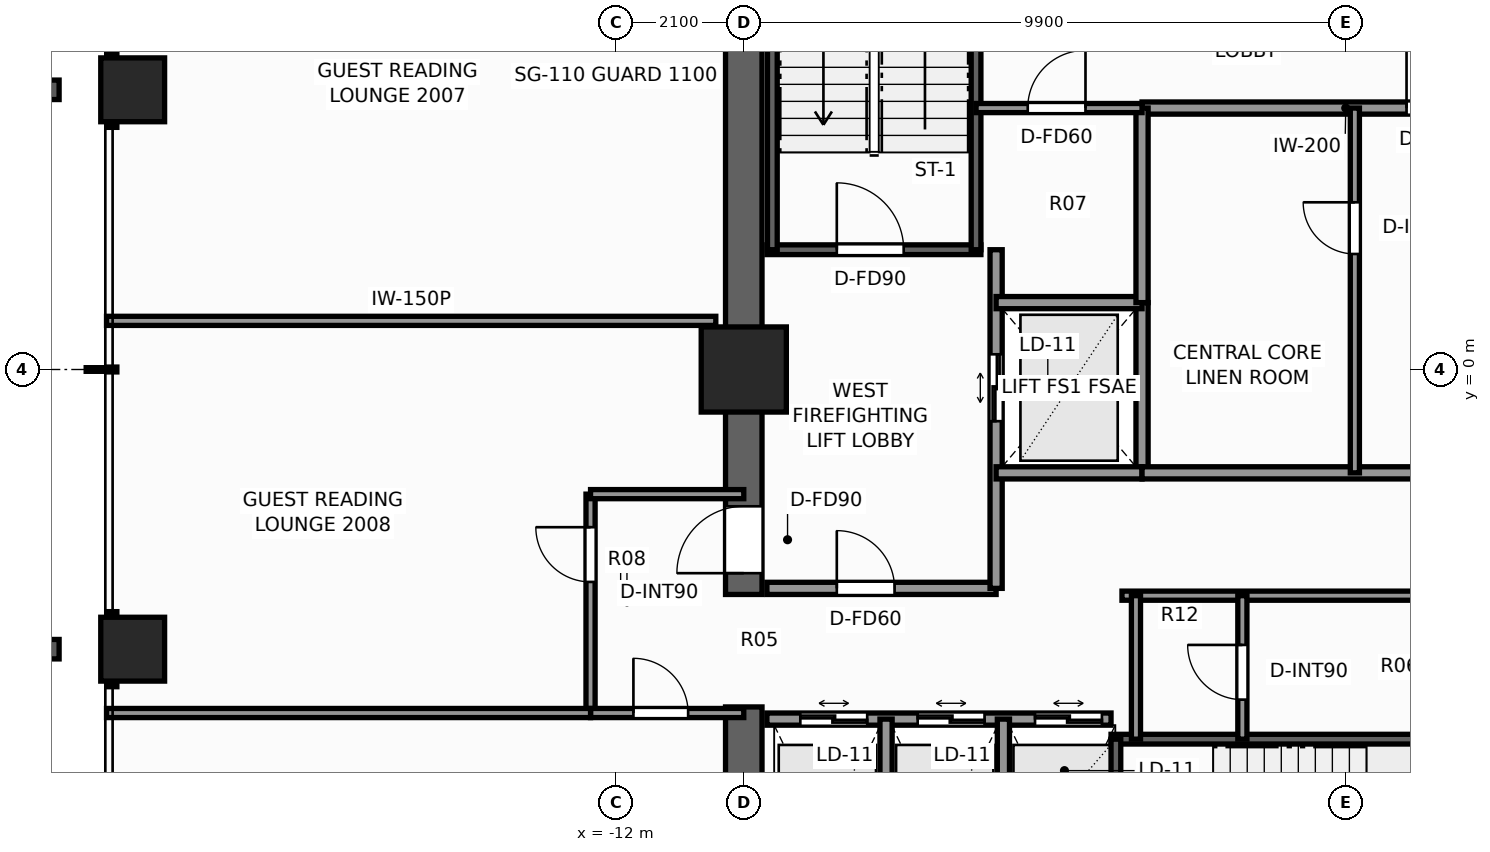
"""IFC4 building model, lengths in metres.
Left out: names, types, materials, properties, quantities, classifications, styles, units other than length and angle.
Written with IfcOpenShell. Run it as: python <this file> out.ifc"""

import sys

from ifc_helpers import new_model, si_unit, direction, frame, frame_2d, origin, origin_2d, place, context, subcontext, project, spatial, rectangle, extrude, element, fill, save


model = new_model("IFC4")
c1 = context("Model", 3, precision=1e-05, world=origin(), true_north=direction((0.0, 1.0)))
c2 = subcontext(c1, "Body", "Model", "MODEL_VIEW")
j1 = project(units=[si_unit("LENGTHUNIT", "METRE"), si_unit("PLANEANGLEUNIT", "RADIAN")], contexts=[c1])
p1 = place(None, origin())
s1 = spatial("IfcSite", under=j1, at=p1, CompositionType="ELEMENT")
p2 = place(p1, origin())
s2 = spatial("IfcBuilding", under=s1, at=p2, CompositionType="ELEMENT")
p3 = place(p2, frame((0.0, 0.0, 72.2)))
s3 = spatial("IfcBuildingStorey", under=s2, at=p3, CompositionType="ELEMENT", Elevation=72.2)
p4 = place(p3, frame((-9.9, -9.6, 0.0), z_axis=(0.0, 0.0, 1.0), x_axis=(0.0, 1.0, 0.0)))
e1 = element("IfcWall", 1, at=p4, inside=s3, PredefinedType="SHEAR", context=c2, shape_type="SweptSolid", body=[
    extrude(rectangle(XDim=4.05, YDim=0.6, at=frame_2d((2.025, 0.0))), origin(), (0.0, 0.0, 1.0), 3.3),
])
p5 = place(p3, frame((-9.9, -3.7, 0.0), z_axis=(0.0, 0.0, 1.0), x_axis=(0.0, 1.0, 0.0)))
e2 = element("IfcWall", 2, at=p5, inside=s3, PredefinedType="SHEAR", context=c2, shape_type="SweptSolid", body=[
    extrude(rectangle(XDim=13.3, YDim=0.6, at=frame_2d((6.65, 0.0))), origin(), (0.0, 0.0, 1.0), 3.3),
])
p6 = place(p5, frame((0.35, 0.0, 0.0)))
e3 = element("IfcOpeningElement", 3, at=p6, cuts=e2, PredefinedType="OPENING", context=c2, shape_type="SweptSolid", body=[
    extrude(rectangle(XDim=1.1, YDim=2.2, at=frame_2d((0.55, 1.1))), frame((0.0, 0.31, 0.0), z_axis=(0.0, -1.0, 0.0), x_axis=(1.0, 0.0, 0.0)), (0.0, 0.0, 1.0), 0.62),
])
p7 = place(p3, frame((-9.9, 0.0, 0.0), z_axis=(0.0, 0.0, 1.0), x_axis=(1.0, 0.0, 0.0)))
e4 = element("IfcColumn", 4, at=p7, inside=s3, PredefinedType="COLUMN", context=c2, shape_type="SweptSolid", body=[
    extrude(rectangle(XDim=1.4, YDim=1.4, at=origin_2d()), origin(), (0.0, 0.0, 1.0), 3.3),
])
for number, where, z_axis, x_axis in (
    (5, (-19.95, -4.6, 0.0), (0.0, 0.0, 1.0), (1.0, 0.0, 0.0)),
    (6, (-19.95, 4.6, 0.0), (0.0, 0.0, 1.0), (1.0, 0.0, 0.0)),
):
    element("IfcColumn", number, at=place(p3, frame(where, z_axis=z_axis, x_axis=x_axis)), inside=s3, PredefinedType="COLUMN", context=c2, shape_type="SweptSolid", body=[
        extrude(rectangle(XDim=1.05, YDim=1.05, at=origin_2d()), origin(), (0.0, 0.0, 1.0), 3.3),
    ])
p8 = place(p3, frame((-9.52, 1.97, 0.0), z_axis=(0.0, 0.0, 1.0), x_axis=(1.0, 0.0, 0.0)))
e7 = element("IfcWall", 7, at=p8, inside=s3, PredefinedType="SHEAR", context=c2, shape_type="SweptSolid", body=[
    extrude(rectangle(XDim=3.52, YDim=0.16, at=frame_2d((1.76, 0.0))), origin(), (0.0, 0.0, 1.0), 3.3),
])
p9 = place(p8, frame((1.15, 0.0, 0.0)))
e8 = element("IfcOpeningElement", 8, at=p9, cuts=e7, PredefinedType="OPENING", context=c2, shape_type="SweptSolid", body=[
    extrude(rectangle(XDim=1.1, YDim=2.2, at=frame_2d((0.55, 1.1))), frame((0.0, 0.09, 0.0), z_axis=(0.0, -1.0, 0.0), x_axis=(1.0, 0.0, 0.0)), (0.0, 0.0, 1.0), 0.18),
])
for number, where, z_axis, x_axis in (
    (9, (-9.43, 1.97, 0.0), (0.0, 0.0, 1.0), (0.0, 1.0, 0.0)),
    (10, (-6.08, 1.97, 0.0), (0.0, 0.0, 1.0), (0.0, 1.0, 0.0)),
):
    element("IfcWall", number, at=place(p3, frame(where, z_axis=z_axis, x_axis=x_axis)), inside=s3, PredefinedType="SHEAR", context=c2, shape_type="SweptSolid", body=[
        extrude(rectangle(XDim=7.56, YDim=0.16, at=frame_2d((3.78, 0.0))), origin(), (0.0, 0.0, 1.0), 3.3),
    ])
p10 = place(p3, frame((-3.86, -6.08, 0.0), z_axis=(0.0, 0.0, 1.0), x_axis=(1.0, 0.0, 0.0)))
e11 = element("IfcWall", 11, at=p10, inside=s3, PredefinedType="SHEAR", context=c2, shape_type="SweptSolid", body=[
    extrude(rectangle(XDim=7.72, YDim=0.16, at=frame_2d((3.86, 0.0))), origin(), (0.0, 0.0, 1.0), 3.3),
])
p11 = place(p3, frame((-3.78, -9.43, 0.0), z_axis=(0.0, 0.0, 1.0), x_axis=(0.0, 1.0, 0.0)))
e12 = element("IfcWall", 12, at=p11, inside=s3, PredefinedType="SHEAR", context=c2, shape_type="SweptSolid", body=[
    extrude(rectangle(XDim=3.35, YDim=0.16, at=frame_2d((1.675, 0.0))), origin(), (0.0, 0.0, 1.0), 3.3),
])
p12 = place(p3, frame((-9.52, -3.6, 0.0), z_axis=(0.0, 0.0, 1.0), x_axis=(1.0, 0.0, 0.0)))
e13 = element("IfcWall", 13, at=p12, inside=s3, PredefinedType="SOLIDWALL", context=c2, shape_type="SweptSolid", body=[
    extrude(rectangle(XDim=3.77, YDim=0.2, at=frame_2d((1.885, 0.0))), origin(), (0.0, 0.0, 1.0), 3.08),
])
p13 = place(p12, frame((1.15, 0.0, 0.0)))
e14 = element("IfcOpeningElement", 14, at=p13, cuts=e13, PredefinedType="OPENING", context=c2, shape_type="SweptSolid", body=[
    extrude(rectangle(XDim=0.95, YDim=2.06, at=frame_2d((0.475, 1.03))), frame((0.0, 0.11, 0.0), z_axis=(0.0, -1.0, 0.0), x_axis=(1.0, 0.0, 0.0)), (0.0, 0.0, 1.0), 0.22),
])
p14 = place(p3, frame((-5.75, -3.6, 0.0), z_axis=(0.0, 0.0, 1.0), x_axis=(0.0, 1.0, 0.0)))
e15 = element("IfcWall", 15, at=p14, inside=s3, PredefinedType="SOLIDWALL", context=c2, shape_type="SweptSolid", body=[
    extrude(rectangle(XDim=5.57, YDim=0.2, at=frame_2d((2.785, 0.0))), origin(), (0.0, 0.0, 1.0), 3.08),
])
p15 = place(p14, frame((2.75, 0.0, 0.0)))
e16 = element("IfcOpeningElement", 16, at=p15, cuts=e15, PredefinedType="OPENING", context=c2, shape_type="SweptSolid", body=[
    extrude(rectangle(XDim=1.1, YDim=2.2, at=frame_2d((0.55, 1.1))), frame((0.0, 0.11, 0.0), z_axis=(0.0, -1.0, 0.0), x_axis=(1.0, 0.0, 0.0)), (0.0, 0.0, 1.0), 0.22),
])
p16 = place(p3, frame((-3.35, -1.7, 0.0), z_axis=(0.0, 0.0, 1.0), x_axis=(0.0, 1.0, 0.0)))
e17 = element("IfcWall", 17, at=p16, inside=s3, PredefinedType="SOLIDWALL", context=c2, shape_type="SweptSolid", body=[
    extrude(rectangle(XDim=2.8, YDim=0.2, at=frame_2d((1.4, 0.0))), origin(), (0.0, 0.0, 1.0), 3.08),
])
for number, where, z_axis, x_axis in (
    (18, (-5.75, -1.7, 0.0), (0.0, 0.0, 1.0), (1.0, 0.0, 0.0)),
    (19, (-5.75, 1.1, 0.0), (0.0, 0.0, 1.0), (1.0, 0.0, 0.0)),
):
    element("IfcWall", number, at=place(p3, frame(where, z_axis=z_axis, x_axis=x_axis)), inside=s3, PredefinedType="SOLIDWALL", context=c2, shape_type="SweptSolid", body=[
        extrude(rectangle(XDim=2.4, YDim=0.2, at=frame_2d((1.2, 0.0))), origin(), (0.0, 0.0, 1.0), 3.08),
    ])
p17 = place(p3, frame((-9.52, -5.75, 0.0), z_axis=(0.0, 0.0, 1.0), x_axis=(1.0, 0.0, 0.0)))
e20 = element("IfcWall", 20, at=p17, inside=s3, PredefinedType="SOLIDWALL", context=c2, shape_type="SweptSolid", body=[
    extrude(rectangle(XDim=5.66, YDim=0.2, at=frame_2d((2.83, 0.0))), origin(), (0.0, 0.0, 1.0), 3.08),
])
p18 = place(p17, frame((0.55, 0.0, 0.0)))
e21 = element("IfcOpeningElement", 21, at=p18, cuts=e20, PredefinedType="OPENING", context=c2, shape_type="SweptSolid", body=[
    extrude(rectangle(XDim=1.1, YDim=2.2, at=frame_2d((0.55, 1.1))), frame((0.0, 0.11, 0.0), z_axis=(0.0, -1.0, 0.0), x_axis=(1.0, 0.0, 0.0)), (0.0, 0.0, 1.0), 0.22),
])
p19 = place(p17, frame((2.48, 0.0, 0.0)))
e22 = element("IfcOpeningElement", 22, at=p19, cuts=e20, PredefinedType="OPENING", context=c2, shape_type="SweptSolid", body=[
    extrude(rectangle(XDim=1.1, YDim=2.2, at=frame_2d((0.55, 1.1))), frame((0.0, 0.11, 0.0), z_axis=(0.0, -1.0, 0.0), x_axis=(1.0, 0.0, 0.0)), (0.0, 0.0, 1.0), 0.22),
])
p20 = place(p17, frame((4.41, 0.0, 0.0)))
e23 = element("IfcOpeningElement", 23, at=p20, cuts=e20, PredefinedType="OPENING", context=c2, shape_type="SweptSolid", body=[
    extrude(rectangle(XDim=1.1, YDim=2.2, at=frame_2d((0.55, 1.1))), frame((0.0, 0.11, 0.0), z_axis=(0.0, -1.0, 0.0), x_axis=(1.0, 0.0, 0.0)), (0.0, 0.0, 1.0), 0.22),
])
for number, where, z_axis, x_axis in (
    (24, (-7.56, -9.52, 0.0), (0.0, 0.0, 1.0), (0.0, 1.0, 0.0)),
    (25, (-5.63, -9.52, 0.0), (0.0, 0.0, 1.0), (0.0, 1.0, 0.0)),
):
    element("IfcWall", number, at=place(p3, frame(where, z_axis=z_axis, x_axis=x_axis)), inside=s3, PredefinedType="SOLIDWALL", context=c2, shape_type="SweptSolid", body=[
        extrude(rectangle(XDim=3.77, YDim=0.2, at=frame_2d((1.885, 0.0))), origin(), (0.0, 0.0, 1.0), 3.08),
    ])
p21 = place(p3, frame((-3.35, 4.3, 0.0), z_axis=(0.0, 0.0, 1.0), x_axis=(1.0, 0.0, 0.0)))
e26 = element("IfcWall", 26, at=p21, inside=s3, PredefinedType="SOLIDWALL", context=c2, shape_type="SweptSolid", body=[
    extrude(rectangle(XDim=6.7, YDim=0.2, at=frame_2d((3.35, 0.0))), origin(), (0.0, 0.0, 1.0), 3.08),
])
p22 = place(p21, frame((4.35, 0.0, 0.0)))
e27 = element("IfcOpeningElement", 27, at=p22, cuts=e26, PredefinedType="OPENING", context=c2, shape_type="SweptSolid", body=[
    extrude(rectangle(XDim=0.95, YDim=2.06, at=frame_2d((0.475, 1.03))), frame((0.0, 0.11, 0.0), z_axis=(0.0, -1.0, 0.0), x_axis=(1.0, 0.0, 0.0)), (0.0, 0.0, 1.0), 0.22),
])
p23 = place(p3, frame((-3.35, -1.7, 0.0), z_axis=(0.0, 0.0, 1.0), x_axis=(1.0, 0.0, 0.0)))
e28 = element("IfcWall", 28, at=p23, inside=s3, PredefinedType="SOLIDWALL", context=c2, shape_type="SweptSolid", body=[
    extrude(rectangle(XDim=6.7, YDim=0.2, at=frame_2d((3.35, 0.0))), origin(), (0.0, 0.0, 1.0), 3.08),
])
p24 = place(p3, frame((-3.35, 1.1, 0.0), z_axis=(0.0, 0.0, 1.0), x_axis=(0.0, 1.0, 0.0)))
e29 = element("IfcWall", 29, at=p24, inside=s3, PredefinedType="SOLIDWALL", context=c2, shape_type="SweptSolid", body=[
    extrude(rectangle(XDim=3.2, YDim=0.2, at=frame_2d((1.6, 0.0))), origin(), (0.0, 0.0, 1.0), 3.08),
])
p25 = place(p3, frame((0.15, -1.7, 0.0), z_axis=(0.0, 0.0, 1.0), x_axis=(0.0, 1.0, 0.0)))
e30 = element("IfcWall", 30, at=p25, inside=s3, PredefinedType="PARTITIONING", context=c2, shape_type="SweptSolid", body=[
    extrude(rectangle(XDim=6.0, YDim=0.15, at=frame_2d((3.0, 0.0))), origin(), (0.0, 0.0, 1.0), 3.08),
])
p26 = place(p25, frame((3.6, 0.0, 0.0)))
e31 = element("IfcOpeningElement", 31, at=p26, cuts=e30, PredefinedType="OPENING", context=c2, shape_type="SweptSolid", body=[
    extrude(rectangle(XDim=0.85, YDim=2.03, at=frame_2d((0.425, 1.015))), frame((0.0, 0.085, 0.0), z_axis=(0.0, -1.0, 0.0), x_axis=(1.0, 0.0, 0.0)), (0.0, 0.0, 1.0), 0.17),
])
p27 = place(p3, frame((-3.68, -3.72, 0.0), z_axis=(0.0, 0.0, 1.0), x_axis=(1.0, 0.0, 0.0)))
e32 = element("IfcWall", 32, at=p27, inside=s3, PredefinedType="PARTITIONING", context=c2, shape_type="SweptSolid", body=[
    extrude(rectangle(XDim=7.36, YDim=0.15, at=frame_2d((3.68, 0.0))), origin(), (0.0, 0.0, 1.0), 3.08),
])
p28 = place(p3, frame((-3.45, -6.08, 0.0), z_axis=(0.0, 0.0, 1.0), x_axis=(0.0, 1.0, 0.0)))
e33 = element("IfcWall", 33, at=p28, inside=s3, PredefinedType="PARTITIONING", context=c2, shape_type="SweptSolid", body=[
    extrude(rectangle(XDim=2.36, YDim=0.15, at=frame_2d((1.18, 0.0))), origin(), (0.0, 0.0, 1.0), 3.08),
])
p29 = place(p3, frame((-1.7, -6.08, 0.0), z_axis=(0.0, 0.0, 1.0), x_axis=(0.0, 1.0, 0.0)))
e34 = element("IfcWall", 34, at=p29, inside=s3, PredefinedType="PARTITIONING", context=c2, shape_type="SweptSolid", body=[
    extrude(rectangle(XDim=2.36, YDim=0.15, at=frame_2d((1.18, 0.0))), origin(), (0.0, 0.0, 1.0), 3.08),
])
p30 = place(p29, frame((0.65, 0.0, 0.0)))
e35 = element("IfcOpeningElement", 35, at=p30, cuts=e34, PredefinedType="OPENING", context=c2, shape_type="SweptSolid", body=[
    extrude(rectangle(XDim=0.9, YDim=2.06, at=frame_2d((0.45, 1.03))), frame((0.0, 0.085, 0.0), z_axis=(0.0, -1.0, 0.0), x_axis=(1.0, 0.0, 0.0)), (0.0, 0.0, 1.0), 0.17),
])
p31 = place(p3, frame((-6.08, 4.3, 0.0), z_axis=(0.0, 0.0, 1.0), x_axis=(1.0, 0.0, 0.0)))
e36 = element("IfcWall", 36, at=p31, inside=s3, PredefinedType="PARTITIONING", context=c2, shape_type="SweptSolid", body=[
    extrude(rectangle(XDim=2.73, YDim=0.15, at=frame_2d((1.365, 0.0))), origin(), (0.0, 0.0, 1.0), 3.08),
])
p32 = place(p31, frame((0.85, 0.0, 0.0)))
e37 = element("IfcOpeningElement", 37, at=p32, cuts=e36, PredefinedType="OPENING", context=c2, shape_type="SweptSolid", body=[
    extrude(rectangle(XDim=0.95, YDim=2.06, at=frame_2d((0.475, 1.03))), frame((0.0, 0.085, 0.0), z_axis=(0.0, -1.0, 0.0), x_axis=(1.0, 0.0, 0.0)), (0.0, 0.0, 1.0), 0.17),
])
p33 = place(p3, frame((-12.42, -5.65, 0.0), z_axis=(0.0, 0.0, 1.0), x_axis=(0.0, 1.0, 0.0)))
e38 = element("IfcWall", 38, at=p33, inside=s3, PredefinedType="PARTITIONING", context=c2, shape_type="SweptSolid", body=[
    extrude(rectangle(XDim=3.6, YDim=0.15, at=frame_2d((1.8, 0.0))), origin(), (0.0, 0.0, 1.0), 2.292),
])
p34 = place(p33, frame((2.156, 0.0, 0.0)))
e39 = element("IfcOpeningElement", 39, at=p34, cuts=e38, PredefinedType="OPENING", context=c2, shape_type="SweptSolid", body=[
    extrude(rectangle(XDim=0.9, YDim=2.06, at=frame_2d((0.45, 1.03))), frame((0.0, 0.085, 0.0), z_axis=(0.0, -1.0, 0.0), x_axis=(1.0, 0.0, 0.0)), (0.0, 0.0, 1.0), 0.17),
])
p35 = place(p3, frame((-12.42, -2.05, 0.0), z_axis=(0.0, 0.0, 1.0), x_axis=(1.0, 0.0, 0.0)))
e40 = element("IfcWall", 40, at=p35, inside=s3, PredefinedType="PARTITIONING", context=c2, shape_type="SweptSolid", body=[
    extrude(rectangle(XDim=2.52, YDim=0.15, at=frame_2d((1.26, 0.0))), origin(), (0.0, 0.0, 1.0), 3.08),
])
p36 = place(p3, frame((-12.42, -5.65, 0.0), z_axis=(0.0, 0.0, 1.0), x_axis=(1.0, 0.0, 0.0)))
e41 = element("IfcWall", 41, at=p36, inside=s3, PredefinedType="PARTITIONING", context=c2, shape_type="SweptSolid", body=[
    extrude(rectangle(XDim=2.52, YDim=0.15, at=frame_2d((1.26, 0.0))), origin(), (0.0, 0.0, 1.0), 3.08),
])
p37 = place(p36, frame((0.705, 0.0, 0.0)))
e42 = element("IfcOpeningElement", 42, at=p37, cuts=e41, PredefinedType="OPENING", context=c2, shape_type="SweptSolid", body=[
    extrude(rectangle(XDim=0.9, YDim=2.06, at=frame_2d((0.45, 1.03))), frame((0.0, 0.085, 0.0), z_axis=(0.0, -1.0, 0.0), x_axis=(1.0, 0.0, 0.0)), (0.0, 0.0, 1.0), 0.17),
])
p38 = place(p3, frame((-20.38, 0.8, 0.0), z_axis=(0.0, 0.0, 1.0), x_axis=(1.0, 0.0, 0.0)))
e43 = element("IfcWall", 43, at=p38, inside=s3, PredefinedType="PARTITIONING", context=c2, shape_type="SweptSolid", body=[
    extrude(rectangle(XDim=10.02, YDim=0.15, at=frame_2d((5.01, 0.0))), origin(), (0.0, 0.0, 1.0), 2.449),
])
p39 = place(p3, frame((-20.38, -5.65, 0.0), z_axis=(0.0, 0.0, 1.0), x_axis=(1.0, 0.0, 0.0)))
e44 = element("IfcWall", 44, at=p39, inside=s3, PredefinedType="PARTITIONING", context=c2, shape_type="SweptSolid", body=[
    extrude(rectangle(XDim=7.96, YDim=0.15, at=frame_2d((3.98, 0.0))), origin(), (0.0, 0.0, 1.0), 2.449),
])
p40 = place(p9, origin())
e45 = element("IfcDoor", 45, at=p40, inside=s3, OperationType="SINGLE_SWING_LEFT", PredefinedType="DOOR", context=c2, shape_type="SweptSolid", body=[
    extrude(rectangle(XDim=1.1, YDim=2.2, at=frame_2d((0.55, 1.1))), frame((0.0, 0.025, 0.0), z_axis=(0.0, -1.0, 0.0), x_axis=(1.0, 0.0, 0.0)), (0.0, 0.0, 1.0), 0.05),
])
fill(e8, e45)
p41 = place(p6, origin())
e46 = element("IfcDoor", 46, at=p41, inside=s3, OperationType="SINGLE_SWING_LEFT", PredefinedType="DOOR", context=c2, shape_type="SweptSolid", body=[
    extrude(rectangle(XDim=1.1, YDim=2.2, at=frame_2d((0.55, 1.1))), frame((0.0, 0.025, 0.0), z_axis=(0.0, -1.0, 0.0), x_axis=(1.0, 0.0, 0.0)), (0.0, 0.0, 1.0), 0.05),
])
fill(e3, e46)
p42 = place(p15, origin())
e47 = element("IfcDoor", 47, at=p42, inside=s3, OperationType="DOUBLE_DOOR_SLIDING", PredefinedType="DOOR", context=c2, shape_type="SweptSolid", body=[
    extrude(rectangle(XDim=1.1, YDim=2.2, at=frame_2d((0.55, 1.1))), frame((0.0, 0.025, 0.0), z_axis=(0.0, -1.0, 0.0), x_axis=(1.0, 0.0, 0.0)), (0.0, 0.0, 1.0), 0.05),
])
fill(e16, e47)
p43 = place(p18, origin())
e48 = element("IfcDoor", 48, at=p43, inside=s3, OperationType="DOUBLE_DOOR_SLIDING", PredefinedType="DOOR", context=c2, shape_type="SweptSolid", body=[
    extrude(rectangle(XDim=1.1, YDim=2.2, at=frame_2d((0.55, 1.1))), frame((0.0, 0.025, 0.0), z_axis=(0.0, -1.0, 0.0), x_axis=(1.0, 0.0, 0.0)), (0.0, 0.0, 1.0), 0.05),
])
fill(e21, e48)
p44 = place(p19, origin())
e49 = element("IfcDoor", 49, at=p44, inside=s3, OperationType="DOUBLE_DOOR_SLIDING", PredefinedType="DOOR", context=c2, shape_type="SweptSolid", body=[
    extrude(rectangle(XDim=1.1, YDim=2.2, at=frame_2d((0.55, 1.1))), frame((0.0, 0.025, 0.0), z_axis=(0.0, -1.0, 0.0), x_axis=(1.0, 0.0, 0.0)), (0.0, 0.0, 1.0), 0.05),
])
fill(e22, e49)
p45 = place(p20, origin())
e50 = element("IfcDoor", 50, at=p45, inside=s3, OperationType="DOUBLE_DOOR_SLIDING", PredefinedType="DOOR", context=c2, shape_type="SweptSolid", body=[
    extrude(rectangle(XDim=1.1, YDim=2.2, at=frame_2d((0.55, 1.1))), frame((0.0, 0.025, 0.0), z_axis=(0.0, -1.0, 0.0), x_axis=(1.0, 0.0, 0.0)), (0.0, 0.0, 1.0), 0.05),
])
fill(e23, e50)
p46 = place(p13, origin())
e51 = element("IfcDoor", 51, at=p46, inside=s3, OperationType="SINGLE_SWING_LEFT", PredefinedType="DOOR", context=c2, shape_type="SweptSolid", body=[
    extrude(rectangle(XDim=0.95, YDim=2.06, at=frame_2d((0.475, 1.03))), frame((0.0, 0.025, 0.0), z_axis=(0.0, -1.0, 0.0), x_axis=(1.0, 0.0, 0.0)), (0.0, 0.0, 1.0), 0.05),
])
fill(e14, e51)
p47 = place(p22, origin())
e52 = element("IfcDoor", 52, at=p47, inside=s3, OperationType="SINGLE_SWING_LEFT", PredefinedType="DOOR", context=c2, shape_type="SweptSolid", body=[
    extrude(rectangle(XDim=0.95, YDim=2.06, at=frame_2d((0.475, 1.03))), frame((0.0, 0.025, 0.0), z_axis=(0.0, -1.0, 0.0), x_axis=(1.0, 0.0, 0.0)), (0.0, 0.0, 1.0), 0.05),
])
fill(e27, e52)
p48 = place(p26, origin())
e53 = element("IfcDoor", 53, at=p48, inside=s3, OperationType="SINGLE_SWING_RIGHT", PredefinedType="DOOR", context=c2, shape_type="SweptSolid", body=[
    extrude(rectangle(XDim=0.85, YDim=2.03, at=frame_2d((0.425, 1.015))), frame((0.0, 0.025, 0.0), z_axis=(0.0, -1.0, 0.0), x_axis=(1.0, 0.0, 0.0)), (0.0, 0.0, 1.0), 0.05),
])
fill(e31, e53)
p49 = place(p30, origin())
e54 = element("IfcDoor", 54, at=p49, inside=s3, OperationType="SINGLE_SWING_RIGHT", PredefinedType="DOOR", context=c2, shape_type="SweptSolid", body=[
    extrude(rectangle(XDim=0.9, YDim=2.06, at=frame_2d((0.45, 1.03))), frame((0.0, 0.025, 0.0), z_axis=(0.0, -1.0, 0.0), x_axis=(1.0, 0.0, 0.0)), (0.0, 0.0, 1.0), 0.05),
])
fill(e35, e54)
p50 = place(p32, origin())
e55 = element("IfcDoor", 55, at=p50, inside=s3, OperationType="SINGLE_SWING_RIGHT", PredefinedType="DOOR", context=c2, shape_type="SweptSolid", body=[
    extrude(rectangle(XDim=0.95, YDim=2.06, at=frame_2d((0.475, 1.03))), frame((0.0, 0.025, 0.0), z_axis=(0.0, -1.0, 0.0), x_axis=(1.0, 0.0, 0.0)), (0.0, 0.0, 1.0), 0.05),
])
fill(e37, e55)
p51 = place(p34, origin())
e56 = element("IfcDoor", 56, at=p51, inside=s3, OperationType="SINGLE_SWING_RIGHT", PredefinedType="DOOR", context=c2, shape_type="SweptSolid", body=[
    extrude(rectangle(XDim=0.9, YDim=2.06, at=frame_2d((0.45, 1.03))), frame((0.0, 0.025, 0.0), z_axis=(0.0, -1.0, 0.0), x_axis=(1.0, 0.0, 0.0)), (0.0, 0.0, 1.0), 0.05),
])
fill(e39, e56)
p52 = place(p37, origin())
e57 = element("IfcDoor", 57, at=p52, inside=s3, OperationType="SINGLE_SWING_LEFT", PredefinedType="DOOR", context=c2, shape_type="SweptSolid", body=[
    extrude(rectangle(XDim=0.9, YDim=2.06, at=frame_2d((0.45, 1.03))), frame((0.0, 0.025, 0.0), z_axis=(0.0, -1.0, 0.0), x_axis=(1.0, 0.0, 0.0)), (0.0, 0.0, 1.0), 0.05),
])
fill(e42, e57)
save(model, sys.argv[1])
